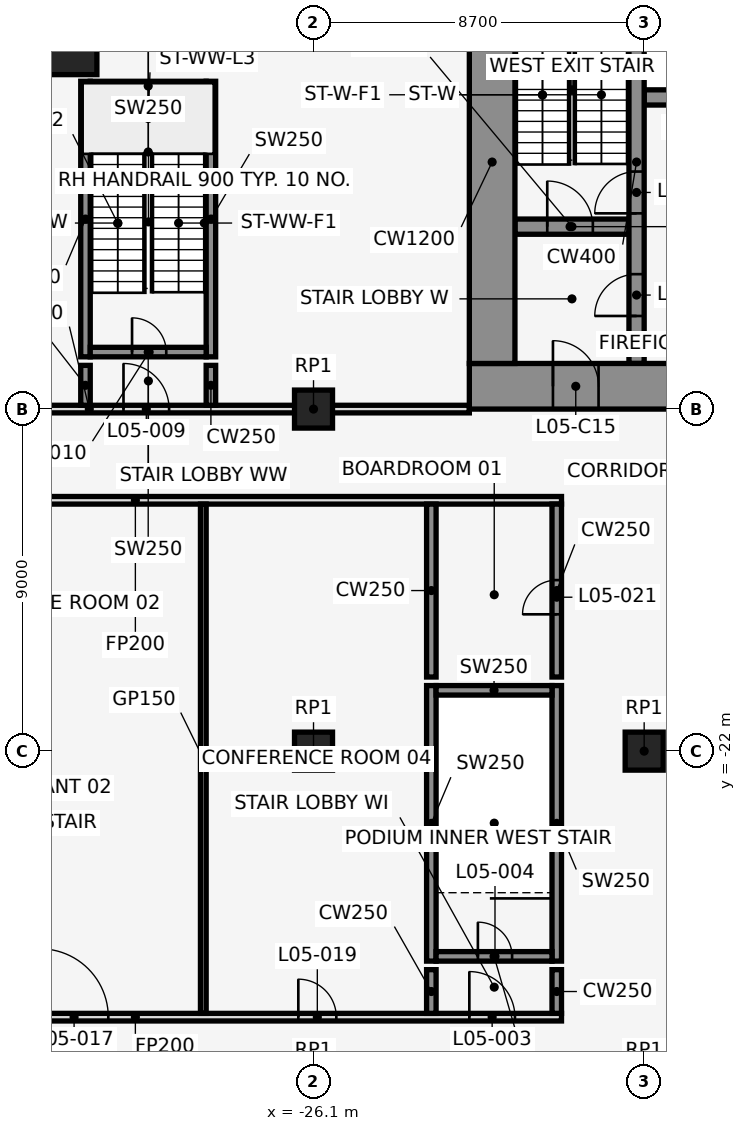
"""IFC4 building model, lengths in metres.
Left out: names, types, materials, properties, quantities, classifications, styles, units other than length and angle.
Written with IfcOpenShell. Run it as: python <this file> out.ifc"""

import sys

from ifc_helpers import new_model, si_unit, direction, frame, frame_2d, origin, origin_2d, place, context, subcontext, project, spatial, rectangle, extrude, element, fill, save


model = new_model("IFC4")
c1 = context("Model", 3, precision=1e-05, world=origin(), true_north=direction((0.0, 1.0)))
c2 = subcontext(c1, "Body", "Model", "MODEL_VIEW")
j1 = project(units=[si_unit("LENGTHUNIT", "METRE"), si_unit("PLANEANGLEUNIT", "RADIAN")], contexts=[c1])
p1 = place(None, origin())
s1 = spatial("IfcSite", under=j1, at=p1, CompositionType="ELEMENT")
p2 = place(p1, origin())
s2 = spatial("IfcBuilding", under=s1, at=p2, CompositionType="ELEMENT")
p3 = place(p2, frame((0.0, 0.0, 30.0)))
s3 = spatial("IfcBuildingStorey", under=s2, at=p3, CompositionType="ELEMENT", Elevation=30.0)
p4 = place(p3, frame((-33.0, -3.0, 0.0), z_axis=(0.0, 0.0, 1.0), x_axis=(1.0, 0.0, 0.0)))
e1 = element("IfcColumn", 1, at=p4, inside=s3, PredefinedType="COLUMN", context=c2, shape_type="SweptSolid", body=[
    extrude(rectangle(XDim=2.4, YDim=2.4, at=origin_2d()), origin(), (0.0, 0.0, 1.0), 5.0),
])
for number, where, z_axis, x_axis in (
    (2, (-26.1, -22.0, 0.0), (0.0, 0.0, 1.0), (1.0, 0.0, 0.0)),
    (3, (-17.4, -22.0, 0.0), (0.0, 0.0, 1.0), (1.0, 0.0, 0.0)),
    (4, (-26.1, -13.0, 0.0), (0.0, 0.0, 1.0), (1.0, 0.0, 0.0)),
):
    element("IfcColumn", number, at=place(p3, frame(where, z_axis=z_axis, x_axis=x_axis)), inside=s3, PredefinedType="COLUMN", context=c2, shape_type="SweptSolid", body=[
        extrude(rectangle(XDim=1.0, YDim=1.0, at=origin_2d()), origin(), (0.0, 0.0, 1.0), 5.0),
    ])
for number, where, z_axis, x_axis in (
    (5, (-32.1, -11.625, 0.0), (0.0, 0.0, 1.0), (0.0, 1.0, 0.0)),
    (6, (-28.8, -11.625, 0.0), (0.0, 0.0, 1.0), (0.0, 1.0, 0.0)),
):
    element("IfcWall", number, at=place(p3, frame(where, z_axis=z_axis, x_axis=x_axis)), inside=s3, PredefinedType="SHEAR", context=c2, shape_type="SweptSolid", body=[
        extrude(rectangle(XDim=7.25, YDim=0.25, at=frame_2d((3.625, 0.0))), origin(), (0.0, 0.0, 1.0), 5.0),
    ])
p5 = place(p3, frame((-31.975, -11.5, 0.0), z_axis=(0.0, 0.0, 1.0), x_axis=(1.0, 0.0, 0.0)))
e7 = element("IfcWall", 7, at=p5, inside=s3, PredefinedType="SHEAR", context=c2, shape_type="SweptSolid", body=[
    extrude(rectangle(XDim=3.05, YDim=0.25, at=frame_2d((1.525, 0.0))), origin(), (0.0, 0.0, 1.0), 5.0),
])
p6 = place(p5, frame((1.1, 0.0, 0.0)))
e8 = element("IfcOpeningElement", 8, at=p6, cuts=e7, PredefinedType="OPENING", context=c2, shape_type="SweptSolid", body=[
    extrude(rectangle(XDim=0.9, YDim=2.1, at=frame_2d((0.45, 1.05))), frame((0.0, 0.137, 0.0), z_axis=(0.0, -1.0, 0.0), x_axis=(1.0, 0.0, 0.0)), (0.0, 0.0, 1.0), 0.274),
])
p7 = place(p3, frame((-31.975, -4.5, 0.0), z_axis=(0.0, 0.0, 1.0), x_axis=(1.0, 0.0, 0.0)))
e9 = element("IfcWall", 9, at=p7, inside=s3, PredefinedType="SHEAR", context=c2, shape_type="SweptSolid", body=[
    extrude(rectangle(XDim=3.05, YDim=0.25, at=frame_2d((1.525, 0.0))), origin(), (0.0, 0.0, 1.0), 5.0),
])
for number, where, z_axis, x_axis in (
    (10, (-23.0, -27.525, 0.0), (0.0, 0.0, 1.0), (0.0, 1.0, 0.0)),
    (11, (-19.7, -27.525, 0.0), (0.0, 0.0, 1.0), (0.0, 1.0, 0.0)),
):
    element("IfcWall", number, at=place(p3, frame(where, z_axis=z_axis, x_axis=x_axis)), inside=s3, PredefinedType="SHEAR", context=c2, shape_type="SweptSolid", body=[
        extrude(rectangle(XDim=7.25, YDim=0.25, at=frame_2d((3.625, 0.0))), origin(), (0.0, 0.0, 1.0), 5.0),
    ])
p8 = place(p3, frame((-22.875, -27.4, 0.0), z_axis=(0.0, 0.0, 1.0), x_axis=(1.0, 0.0, 0.0)))
e12 = element("IfcWall", 12, at=p8, inside=s3, PredefinedType="SHEAR", context=c2, shape_type="SweptSolid", body=[
    extrude(rectangle(XDim=3.05, YDim=0.25, at=frame_2d((1.525, 0.0))), origin(), (0.0, 0.0, 1.0), 5.0),
])
p9 = place(p8, frame((1.1, 0.0, 0.0)))
e13 = element("IfcOpeningElement", 13, at=p9, cuts=e12, PredefinedType="OPENING", context=c2, shape_type="SweptSolid", body=[
    extrude(rectangle(XDim=0.9, YDim=2.1, at=frame_2d((0.45, 1.05))), frame((0.0, 0.137, 0.0), z_axis=(0.0, -1.0, 0.0), x_axis=(1.0, 0.0, 0.0)), (0.0, 0.0, 1.0), 0.274),
])
p10 = place(p3, frame((-22.875, -20.4, 0.0), z_axis=(0.0, 0.0, 1.0), x_axis=(1.0, 0.0, 0.0)))
e14 = element("IfcWall", 14, at=p10, inside=s3, PredefinedType="SHEAR", context=c2, shape_type="SweptSolid", body=[
    extrude(rectangle(XDim=3.05, YDim=0.25, at=frame_2d((1.525, 0.0))), origin(), (0.0, 0.0, 1.0), 5.0),
])
p11 = place(p3, frame((-42.0, -29.0, 0.0), z_axis=(0.0, 0.0, 1.0), x_axis=(1.0, 0.0, 0.0)))
e15 = element("IfcWall", 15, at=p11, inside=s3, PredefinedType="PARTITIONING", context=c2, shape_type="SweptSolid", body=[
    extrude(rectangle(XDim=22.425, YDim=0.2, at=frame_2d((11.212, 0.0))), origin(), (0.0, 0.0, 1.0), 3.74),
])
p12 = place(p11, frame((1.7, 0.0, 0.0)))
e16 = element("IfcOpeningElement", 16, at=p12, cuts=e15, PredefinedType="OPENING", context=c2, shape_type="SweptSolid", body=[
    extrude(rectangle(XDim=1.2, YDim=2.1, at=frame_2d((0.6, 1.05))), frame((0.0, 0.112, 0.0), z_axis=(0.0, -1.0, 0.0), x_axis=(1.0, 0.0, 0.0)), (0.0, 0.0, 1.0), 0.224),
])
p13 = place(p11, frame((20.0, 0.0, 0.0)))
e17 = element("IfcOpeningElement", 17, at=p13, cuts=e15, PredefinedType="OPENING", context=c2, shape_type="SweptSolid", body=[
    extrude(rectangle(XDim=1.2, YDim=2.1, at=frame_2d((0.6, 1.05))), frame((0.0, 0.112, 0.0), z_axis=(0.0, -1.0, 0.0), x_axis=(1.0, 0.0, 0.0)), (0.0, 0.0, 1.0), 0.224),
])
p14 = place(p11, frame((8.7, 0.0, 0.0)))
e18 = element("IfcOpeningElement", 18, at=p14, cuts=e15, PredefinedType="OPENING", context=c2, shape_type="SweptSolid", body=[
    extrude(rectangle(XDim=1.8, YDim=2.1, at=frame_2d((0.9, 1.05))), frame((0.0, 0.112, 0.0), z_axis=(0.0, -1.0, 0.0), x_axis=(1.0, 0.0, 0.0)), (0.0, 0.0, 1.0), 0.224),
])
p15 = place(p11, frame((15.5, 0.0, 0.0)))
e19 = element("IfcOpeningElement", 19, at=p15, cuts=e15, PredefinedType="OPENING", context=c2, shape_type="SweptSolid", body=[
    extrude(rectangle(XDim=1.0, YDim=2.1, at=frame_2d((0.5, 1.05))), frame((0.0, 0.112, 0.0), z_axis=(0.0, -1.0, 0.0), x_axis=(1.0, 0.0, 0.0)), (0.0, 0.0, 1.0), 0.224),
])
p16 = place(p3, frame((-42.0, -15.4, 0.0), z_axis=(0.0, 0.0, 1.0), x_axis=(1.0, 0.0, 0.0)))
e20 = element("IfcWall", 20, at=p16, inside=s3, PredefinedType="PARTITIONING", context=c2, shape_type="SweptSolid", body=[
    extrude(rectangle(XDim=22.425, YDim=0.2, at=frame_2d((11.212, 0.0))), origin(), (0.0, 0.0, 1.0), 3.74),
])
p17 = place(p16, frame((1.5, 0.0, 0.0)))
e21 = element("IfcOpeningElement", 21, at=p17, cuts=e20, PredefinedType="OPENING", context=c2, shape_type="SweptSolid", body=[
    extrude(rectangle(XDim=0.9, YDim=2.1, at=frame_2d((0.45, 1.05))), frame((0.0, 0.112, 0.0), z_axis=(0.0, -1.0, 0.0), x_axis=(1.0, 0.0, 0.0)), (0.0, 0.0, 1.0), 0.224),
])
p18 = place(p3, frame((-42.0, -13.0, 0.0), z_axis=(0.0, 0.0, 1.0), x_axis=(1.0, 0.0, 0.0)))
e22 = element("IfcWall", 22, at=p18, inside=s3, PredefinedType="PARTITIONING", context=c2, shape_type="SweptSolid", body=[
    extrude(rectangle(XDim=20.0, YDim=0.2, at=frame_2d((10.0, 0.0))), origin(), (0.0, 0.0, 1.0), 3.74),
])
p19 = place(p18, frame((10.9, 0.0, 0.0)))
e23 = element("IfcOpeningElement", 23, at=p19, cuts=e22, PredefinedType="OPENING", context=c2, shape_type="SweptSolid", body=[
    extrude(rectangle(XDim=1.2, YDim=2.1, at=frame_2d((0.6, 1.05))), frame((0.0, 0.112, 0.0), z_axis=(0.0, -1.0, 0.0), x_axis=(1.0, 0.0, 0.0)), (0.0, 0.0, 1.0), 0.224),
])
p20 = place(p18, frame((4.4, 0.0, 0.0)))
e24 = element("IfcOpeningElement", 24, at=p20, cuts=e22, PredefinedType="OPENING", context=c2, shape_type="SweptSolid", body=[
    extrude(rectangle(XDim=1.0, YDim=2.1, at=frame_2d((0.5, 1.05))), frame((0.0, 0.112, 0.0), z_axis=(0.0, -1.0, 0.0), x_axis=(1.0, 0.0, 0.0)), (0.0, 0.0, 1.0), 0.224),
])
p21 = place(p3, frame((-32.1, -12.9, 0.0), z_axis=(0.0, 0.0, 1.0), x_axis=(0.0, 1.0, 0.0)))
e25 = element("IfcWall", 25, at=p21, inside=s3, PredefinedType="SHEAR", context=c2, shape_type="SweptSolid", body=[
    extrude(rectangle(XDim=1.05, YDim=0.25, at=frame_2d((0.525, 0.0))), origin(), (0.0, 0.0, 1.0), 5.0),
])
p22 = place(p3, frame((-29.0, -28.9, 0.0), z_axis=(0.0, 0.0, 1.0), x_axis=(0.0, 1.0, 0.0)))
e26 = element("IfcWall", 26, at=p22, inside=s3, PredefinedType="PARTITIONING", context=c2, shape_type="SweptSolid", body=[
    extrude(rectangle(XDim=13.4, YDim=0.15, at=frame_2d((6.7, 0.0))), origin(), (0.0, 0.0, 1.0), 3.74),
])
p23 = place(p3, frame((-28.8, -12.9, 0.0), z_axis=(0.0, 0.0, 1.0), x_axis=(0.0, 1.0, 0.0)))
e27 = element("IfcWall", 27, at=p23, inside=s3, PredefinedType="SHEAR", context=c2, shape_type="SweptSolid", body=[
    extrude(rectangle(XDim=1.05, YDim=0.25, at=frame_2d((0.525, 0.0))), origin(), (0.0, 0.0, 1.0), 5.0),
])
p24 = place(p3, frame((-23.0, -28.9, 0.0), z_axis=(0.0, 0.0, 1.0), x_axis=(0.0, 1.0, 0.0)))
e28 = element("IfcWall", 28, at=p24, inside=s3, PredefinedType="SHEAR", context=c2, shape_type="SweptSolid", body=[
    extrude(rectangle(XDim=1.15, YDim=0.25, at=frame_2d((0.575, 0.0))), origin(), (0.0, 0.0, 1.0), 5.0),
])
p25 = place(p3, frame((-23.0, -20.05, 0.0), z_axis=(0.0, 0.0, 1.0), x_axis=(0.0, 1.0, 0.0)))
e29 = element("IfcWall", 29, at=p25, inside=s3, PredefinedType="SHEAR", context=c2, shape_type="SweptSolid", body=[
    extrude(rectangle(XDim=4.55, YDim=0.25, at=frame_2d((2.275, 0.0))), origin(), (0.0, 0.0, 1.0), 5.0),
])
p26 = place(p3, frame((-19.7, -28.9, 0.0), z_axis=(0.0, 0.0, 1.0), x_axis=(0.0, 1.0, 0.0)))
e30 = element("IfcWall", 30, at=p26, inside=s3, PredefinedType="SHEAR", context=c2, shape_type="SweptSolid", body=[
    extrude(rectangle(XDim=1.15, YDim=0.25, at=frame_2d((0.575, 0.0))), origin(), (0.0, 0.0, 1.0), 5.0),
])
p27 = place(p3, frame((-19.7, -20.05, 0.0), z_axis=(0.0, 0.0, 1.0), x_axis=(0.0, 1.0, 0.0)))
e31 = element("IfcWall", 31, at=p27, inside=s3, PredefinedType="SHEAR", context=c2, shape_type="SweptSolid", body=[
    extrude(rectangle(XDim=4.55, YDim=0.25, at=frame_2d((2.275, 0.0))), origin(), (0.0, 0.0, 1.0), 5.0),
])
p28 = place(p27, frame((1.65, 0.0, 0.0)))
e32 = element("IfcOpeningElement", 32, at=p28, cuts=e31, PredefinedType="OPENING", context=c2, shape_type="SweptSolid", body=[
    extrude(rectangle(XDim=0.9, YDim=2.1, at=frame_2d((0.45, 1.05))), frame((0.0, 0.137, 0.0), z_axis=(0.0, -1.0, 0.0), x_axis=(1.0, 0.0, 0.0)), (0.0, 0.0, 1.0), 0.274),
])
p29 = place(p3, frame((-20.8, -8.2, 0.0), z_axis=(0.0, 0.0, 1.0), x_axis=(1.0, 0.0, 0.0)))
e33 = element("IfcWall", 33, at=p29, inside=s3, PredefinedType="SHEAR", context=c2, shape_type="SweptSolid", body=[
    extrude(rectangle(XDim=3.0, YDim=0.4, at=frame_2d((1.5, 0.0))), origin(), (0.0, 0.0, 1.0), 5.0),
])
p30 = place(p29, frame((0.85, 0.0, 0.0)))
e34 = element("IfcOpeningElement", 34, at=p30, cuts=e33, PredefinedType="OPENING", context=c2, shape_type="SweptSolid", body=[
    extrude(rectangle(XDim=1.2, YDim=2.1, at=frame_2d((0.6, 1.05))), frame((0.0, 0.212, 0.0), z_axis=(0.0, -1.0, 0.0), x_axis=(1.0, 0.0, 0.0)), (0.0, 0.0, 1.0), 0.424),
])
p31 = place(p3, frame((-17.4, -4.8, 0.0), z_axis=(0.0, 0.0, 1.0), x_axis=(1.0, 0.0, 0.0)))
e35 = element("IfcWall", 35, at=p31, inside=s3, PredefinedType="SHEAR", context=c2, shape_type="SweptSolid", body=[
    extrude(rectangle(XDim=13.6, YDim=0.4, at=frame_2d((6.8, 0.0))), origin(), (0.0, 0.0, 1.0), 5.0),
])
p32 = place(p31, frame((0.65, 0.0, 0.0)))
e36 = element("IfcOpeningElement", 36, at=p32, cuts=e35, PredefinedType="OPENING", context=c2, shape_type="SweptSolid", body=[
    extrude(rectangle(XDim=1.1, YDim=2.1, at=frame_2d((0.55, 1.05))), frame((0.0, 0.212, 0.0), z_axis=(0.0, -1.0, 0.0), x_axis=(1.0, 0.0, 0.0)), (0.0, 0.0, 1.0), 0.424),
])
p33 = place(p31, frame((2.95, 0.0, 0.0)))
e37 = element("IfcOpeningElement", 37, at=p33, cuts=e35, PredefinedType="OPENING", context=c2, shape_type="SweptSolid", body=[
    extrude(rectangle(XDim=1.1, YDim=2.1, at=frame_2d((0.55, 1.05))), frame((0.0, 0.212, 0.0), z_axis=(0.0, -1.0, 0.0), x_axis=(1.0, 0.0, 0.0)), (0.0, 0.0, 1.0), 0.424),
])
p34 = place(p31, frame((5.65, 0.0, 0.0)))
e38 = element("IfcOpeningElement", 38, at=p34, cuts=e35, PredefinedType="OPENING", context=c2, shape_type="SweptSolid", body=[
    extrude(rectangle(XDim=1.2, YDim=2.1, at=frame_2d((0.6, 1.05))), frame((0.0, 0.212, 0.0), z_axis=(0.0, -1.0, 0.0), x_axis=(1.0, 0.0, 0.0)), (0.0, 0.0, 1.0), 0.424),
])
p35 = place(p31, frame((8.65, 0.0, 0.0)))
e39 = element("IfcOpeningElement", 39, at=p35, cuts=e35, PredefinedType="OPENING", context=c2, shape_type="SweptSolid", body=[
    extrude(rectangle(XDim=1.2, YDim=2.1, at=frame_2d((0.6, 1.05))), frame((0.0, 0.212, 0.0), z_axis=(0.0, -1.0, 0.0), x_axis=(1.0, 0.0, 0.0)), (0.0, 0.0, 1.0), 0.424),
])
p36 = place(p31, frame((11.65, 0.0, 0.0)))
e40 = element("IfcOpeningElement", 40, at=p36, cuts=e35, PredefinedType="OPENING", context=c2, shape_type="SweptSolid", body=[
    extrude(rectangle(XDim=1.2, YDim=2.1, at=frame_2d((0.6, 1.05))), frame((0.0, 0.212, 0.0), z_axis=(0.0, -1.0, 0.0), x_axis=(1.0, 0.0, 0.0)), (0.0, 0.0, 1.0), 0.424),
])
p37 = place(p3, frame((-17.6, -11.8, 0.0), z_axis=(0.0, 0.0, 1.0), x_axis=(0.0, 1.0, 0.0)))
e41 = element("IfcWall", 41, at=p37, inside=s3, PredefinedType="SHEAR", context=c2, shape_type="SweptSolid", body=[
    extrude(rectangle(XDim=10.6, YDim=0.4, at=frame_2d((5.3, 0.0))), origin(), (0.0, 0.0, 1.0), 5.0),
])
p38 = place(p37, frame((1.25, 0.0, 0.0)))
e42 = element("IfcOpeningElement", 42, at=p38, cuts=e41, PredefinedType="OPENING", context=c2, shape_type="SweptSolid", body=[
    extrude(rectangle(XDim=1.1, YDim=2.1, at=frame_2d((0.55, 1.05))), frame((0.0, 0.212, 0.0), z_axis=(0.0, -1.0, 0.0), x_axis=(1.0, 0.0, 0.0)), (0.0, 0.0, 1.0), 0.424),
])
p39 = place(p37, frame((3.95, 0.0, 0.0)))
e43 = element("IfcOpeningElement", 43, at=p39, cuts=e41, PredefinedType="OPENING", context=c2, shape_type="SweptSolid", body=[
    extrude(rectangle(XDim=1.1, YDim=2.1, at=frame_2d((0.55, 1.05))), frame((0.0, 0.212, 0.0), z_axis=(0.0, -1.0, 0.0), x_axis=(1.0, 0.0, 0.0)), (0.0, 0.0, 1.0), 0.424),
])
p40 = place(p3, frame((-22.0, -12.4, 0.0), z_axis=(0.0, 0.0, 1.0), x_axis=(1.0, 0.0, 0.0)))
e44 = element("IfcWall", 44, at=p40, inside=s3, PredefinedType="SHEAR", context=c2, shape_type="SweptSolid", body=[
    extrude(rectangle(XDim=44.0, YDim=1.2, at=frame_2d((22.0, 0.0))), origin(), (0.0, 0.0, 1.0), 5.0),
])
p41 = place(p40, frame((2.2, 0.0, 0.0)))
e45 = element("IfcOpeningElement", 45, at=p41, cuts=e44, PredefinedType="OPENING", context=c2, shape_type="SweptSolid", body=[
    extrude(rectangle(XDim=1.2, YDim=2.1, at=frame_2d((0.6, 1.05))), frame((0.0, 0.612, 0.0), z_axis=(0.0, -1.0, 0.0), x_axis=(1.0, 0.0, 0.0)), (0.0, 0.0, 1.0), 1.224),
])
p42 = place(p40, frame((21.4, 0.0, 0.0)))
e46 = element("IfcOpeningElement", 46, at=p42, cuts=e44, PredefinedType="OPENING", context=c2, shape_type="SweptSolid", body=[
    extrude(rectangle(XDim=1.2, YDim=2.1, at=frame_2d((0.6, 1.05))), frame((0.0, 0.612, 0.0), z_axis=(0.0, -1.0, 0.0), x_axis=(1.0, 0.0, 0.0)), (0.0, 0.0, 1.0), 1.224),
])
p43 = place(p40, frame((40.6, 0.0, 0.0)))
e47 = element("IfcOpeningElement", 47, at=p43, cuts=e44, PredefinedType="OPENING", context=c2, shape_type="SweptSolid", body=[
    extrude(rectangle(XDim=1.2, YDim=2.1, at=frame_2d((0.6, 1.05))), frame((0.0, 0.612, 0.0), z_axis=(0.0, -1.0, 0.0), x_axis=(1.0, 0.0, 0.0)), (0.0, 0.0, 1.0), 1.224),
])
p44 = place(p40, frame((16.0, 0.0, 0.0)))
e48 = element("IfcOpeningElement", 48, at=p44, cuts=e44, PredefinedType="OPENING", context=c2, shape_type="SweptSolid", body=[
    extrude(rectangle(XDim=1.8, YDim=2.1, at=frame_2d((0.9, 1.05))), frame((0.0, 0.612, 0.0), z_axis=(0.0, -1.0, 0.0), x_axis=(1.0, 0.0, 0.0)), (0.0, 0.0, 1.0), 1.224),
])
p45 = place(p40, frame((6.3, 0.0, 0.0)))
e49 = element("IfcOpeningElement", 49, at=p45, cuts=e44, PredefinedType="OPENING", context=c2, shape_type="SweptSolid", body=[
    extrude(rectangle(XDim=1.2, YDim=2.1, at=frame_2d((0.6, 1.05))), frame((0.0, 0.612, 0.0), z_axis=(0.0, -1.0, 0.0), x_axis=(1.0, 0.0, 0.0)), (0.0, 0.0, 1.0), 1.224),
])
p46 = place(p40, frame((26.2, 0.0, 0.0)))
e50 = element("IfcOpeningElement", 50, at=p46, cuts=e44, PredefinedType="OPENING", context=c2, shape_type="SweptSolid", body=[
    extrude(rectangle(XDim=1.8, YDim=2.1, at=frame_2d((0.9, 1.05))), frame((0.0, 0.612, 0.0), z_axis=(0.0, -1.0, 0.0), x_axis=(1.0, 0.0, 0.0)), (0.0, 0.0, 1.0), 1.224),
])
p47 = place(p40, frame((36.5, 0.0, 0.0)))
e51 = element("IfcOpeningElement", 51, at=p47, cuts=e44, PredefinedType="OPENING", context=c2, shape_type="SweptSolid", body=[
    extrude(rectangle(XDim=1.2, YDim=2.1, at=frame_2d((0.6, 1.05))), frame((0.0, 0.612, 0.0), z_axis=(0.0, -1.0, 0.0), x_axis=(1.0, 0.0, 0.0)), (0.0, 0.0, 1.0), 1.224),
])
p48 = place(p3, frame((-21.4, -11.8, 0.0), z_axis=(0.0, 0.0, 1.0), x_axis=(0.0, 1.0, 0.0)))
e52 = element("IfcWall", 52, at=p48, inside=s3, PredefinedType="SHEAR", context=c2, shape_type="SweptSolid", body=[
    extrude(rectangle(XDim=10.6, YDim=1.2, at=frame_2d((5.3, 0.0))), origin(), (0.0, 0.0, 1.0), 5.0),
])
p49 = place(p13, origin())
e53 = element("IfcDoor", 53, at=p49, inside=s3, OperationType="SINGLE_SWING_RIGHT", PredefinedType="DOOR", context=c2, shape_type="SweptSolid", body=[
    extrude(rectangle(XDim=1.2, YDim=2.1, at=frame_2d((0.6, 1.05))), frame((0.0, 0.025, 0.0), z_axis=(0.0, -1.0, 0.0), x_axis=(1.0, 0.0, 0.0)), (0.0, 0.0, 1.0), 0.05),
])
fill(e17, e53)
p50 = place(p9, origin())
e54 = element("IfcDoor", 54, at=p50, inside=s3, OperationType="SINGLE_SWING_LEFT", PredefinedType="DOOR", context=c2, shape_type="SweptSolid", body=[
    extrude(rectangle(XDim=0.9, YDim=2.1, at=frame_2d((0.45, 1.05))), frame((0.0, 0.025, 0.0), z_axis=(0.0, -1.0, 0.0), x_axis=(1.0, 0.0, 0.0)), (0.0, 0.0, 1.0), 0.05),
])
fill(e13, e54)
p51 = place(p19, origin())
e55 = element("IfcDoor", 55, at=p51, inside=s3, OperationType="SINGLE_SWING_RIGHT", PredefinedType="DOOR", context=c2, shape_type="SweptSolid", body=[
    extrude(rectangle(XDim=1.2, YDim=2.1, at=frame_2d((0.6, 1.05))), frame((0.0, 0.025, 0.0), z_axis=(0.0, -1.0, 0.0), x_axis=(1.0, 0.0, 0.0)), (0.0, 0.0, 1.0), 0.05),
])
fill(e23, e55)
p52 = place(p6, origin())
e56 = element("IfcDoor", 56, at=p52, inside=s3, OperationType="SINGLE_SWING_LEFT", PredefinedType="DOOR", context=c2, shape_type="SweptSolid", body=[
    extrude(rectangle(XDim=0.9, YDim=2.1, at=frame_2d((0.45, 1.05))), frame((0.0, 0.025, 0.0), z_axis=(0.0, -1.0, 0.0), x_axis=(1.0, 0.0, 0.0)), (0.0, 0.0, 1.0), 0.05),
])
fill(e8, e56)
p53 = place(p14, origin())
e57 = element("IfcDoor", 57, at=p53, inside=s3, OperationType="SINGLE_SWING_LEFT", PredefinedType="DOOR", context=c2, shape_type="SweptSolid", body=[
    extrude(rectangle(XDim=1.8, YDim=2.1, at=frame_2d((0.9, 1.05))), frame((0.0, 0.025, 0.0), z_axis=(0.0, -1.0, 0.0), x_axis=(1.0, 0.0, 0.0)), (0.0, 0.0, 1.0), 0.05),
])
fill(e18, e57)
p54 = place(p15, origin())
e58 = element("IfcDoor", 58, at=p54, inside=s3, OperationType="SINGLE_SWING_LEFT", PredefinedType="DOOR", context=c2, shape_type="SweptSolid", body=[
    extrude(rectangle(XDim=1.0, YDim=2.1, at=frame_2d((0.5, 1.05))), frame((0.0, 0.025, 0.0), z_axis=(0.0, -1.0, 0.0), x_axis=(1.0, 0.0, 0.0)), (0.0, 0.0, 1.0), 0.05),
])
fill(e19, e58)
p55 = place(p28, origin())
e59 = element("IfcDoor", 59, at=p55, inside=s3, OperationType="SINGLE_SWING_RIGHT", PredefinedType="DOOR", context=c2, shape_type="SweptSolid", body=[
    extrude(rectangle(XDim=0.9, YDim=2.1, at=frame_2d((0.45, 1.05))), frame((0.0, 0.025, 0.0), z_axis=(0.0, -1.0, 0.0), x_axis=(1.0, 0.0, 0.0)), (0.0, 0.0, 1.0), 0.05),
])
fill(e32, e59)
p56 = place(p30, origin())
e60 = element("IfcDoor", 60, at=p56, inside=s3, OperationType="SINGLE_SWING_LEFT", PredefinedType="DOOR", context=c2, shape_type="SweptSolid", body=[
    extrude(rectangle(XDim=1.2, YDim=2.1, at=frame_2d((0.6, 1.05))), frame((0.0, 0.025, 0.0), z_axis=(0.0, -1.0, 0.0), x_axis=(1.0, 0.0, 0.0)), (0.0, 0.0, 1.0), 0.05),
])
fill(e34, e60)
p57 = place(p38, frame((1.1, 0.0, 0.0), z_axis=(0.0, 0.0, 1.0), x_axis=(-1.0, 0.0, 0.0)))
e61 = element("IfcDoor", 61, at=p57, inside=s3, OperationType="SINGLE_SWING_LEFT", PredefinedType="DOOR", context=c2, shape_type="SweptSolid", body=[
    extrude(rectangle(XDim=1.1, YDim=2.1, at=frame_2d((0.55, 1.05))), frame((0.0, 0.025, 0.0), z_axis=(0.0, -1.0, 0.0), x_axis=(1.0, 0.0, 0.0)), (0.0, 0.0, 1.0), 0.05),
])
fill(e42, e61)
p58 = place(p39, frame((1.1, 0.0, 0.0), z_axis=(0.0, 0.0, 1.0), x_axis=(-1.0, 0.0, 0.0)))
e62 = element("IfcDoor", 62, at=p58, inside=s3, OperationType="SINGLE_SWING_LEFT", PredefinedType="DOOR", context=c2, shape_type="SweptSolid", body=[
    extrude(rectangle(XDim=1.1, YDim=2.1, at=frame_2d((0.55, 1.05))), frame((0.0, 0.025, 0.0), z_axis=(0.0, -1.0, 0.0), x_axis=(1.0, 0.0, 0.0)), (0.0, 0.0, 1.0), 0.05),
])
fill(e43, e62)
p59 = place(p41, frame((1.2, 0.0, 0.0), z_axis=(0.0, 0.0, 1.0), x_axis=(-1.0, 0.0, 0.0)))
e63 = element("IfcDoor", 63, at=p59, inside=s3, OperationType="SINGLE_SWING_RIGHT", PredefinedType="DOOR", context=c2, shape_type="SweptSolid", body=[
    extrude(rectangle(XDim=1.2, YDim=2.1, at=frame_2d((0.6, 1.05))), frame((0.0, 0.025, 0.0), z_axis=(0.0, -1.0, 0.0), x_axis=(1.0, 0.0, 0.0)), (0.0, 0.0, 1.0), 0.05),
])
fill(e45, e63)
save(model, sys.argv[1])
